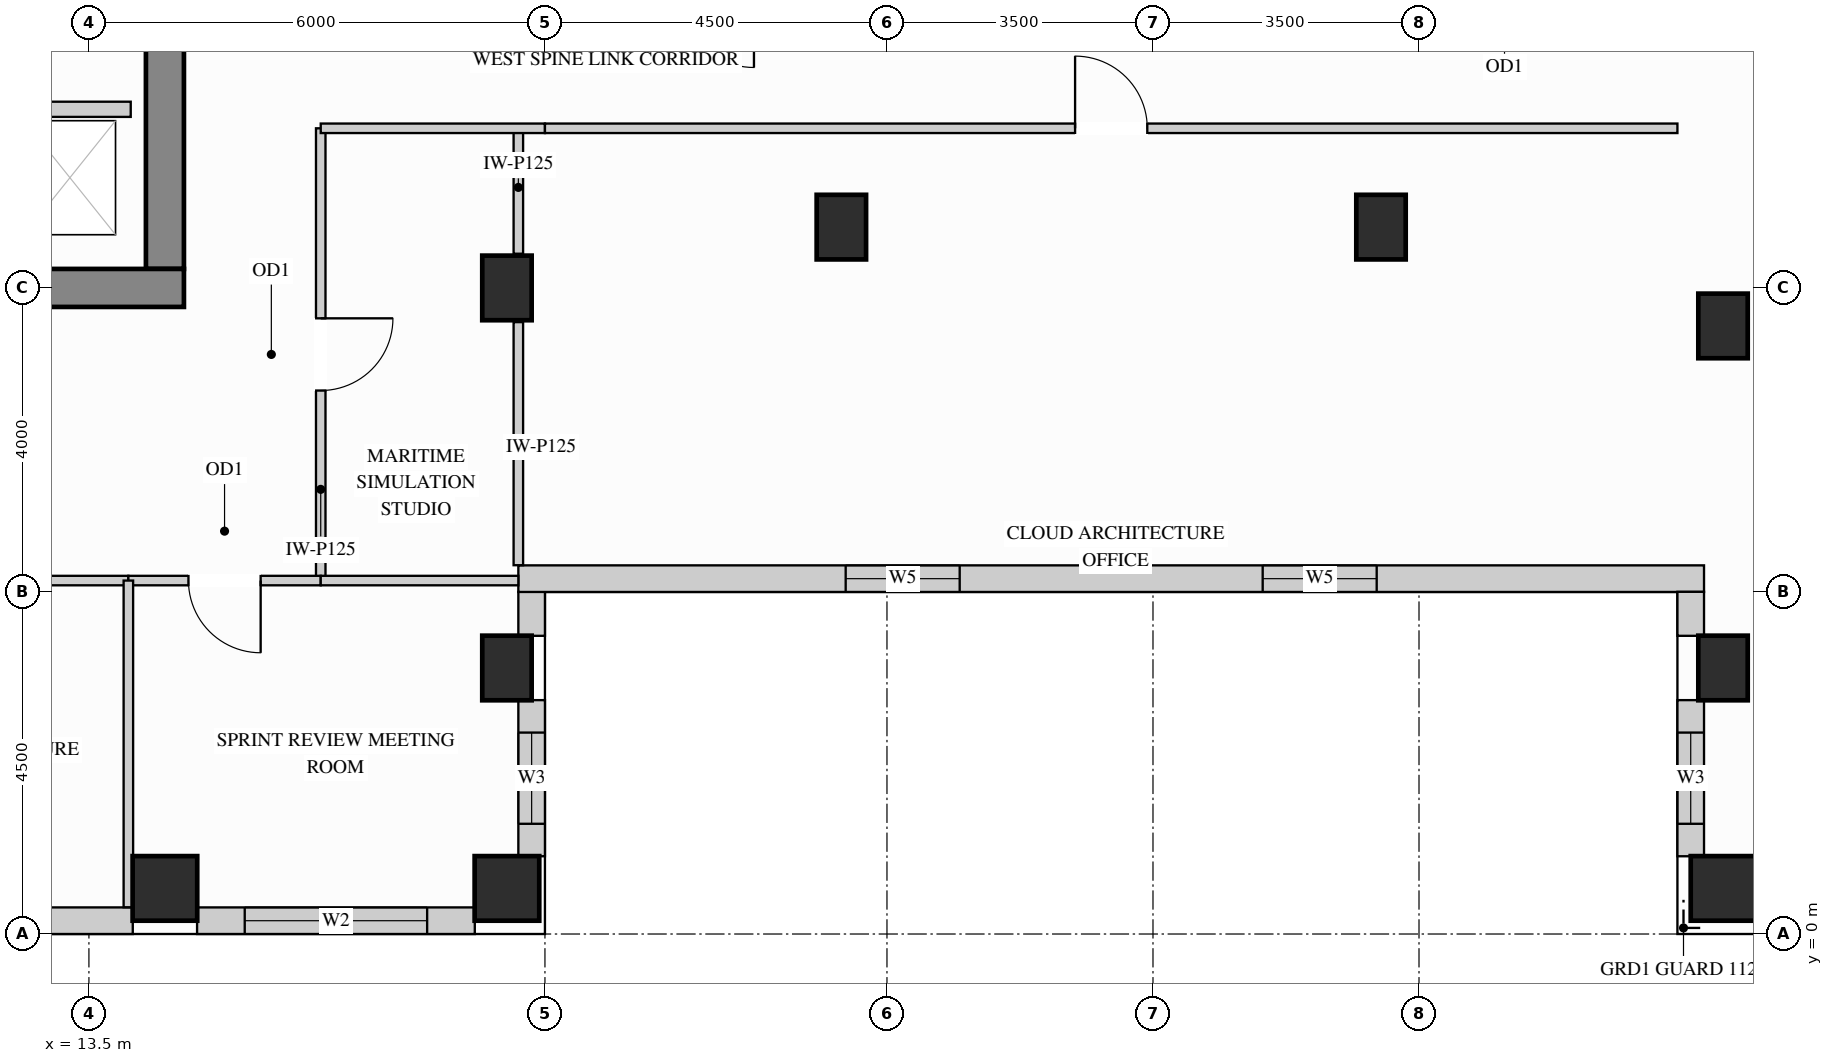
"""IFC4 building model, lengths in metres.
Left out: names, types, materials, properties, quantities, classifications, styles, units other than length and angle.
Written with IfcOpenShell. Run it as: python <this file> out.ifc"""

import sys

from ifc_helpers import new_model, si_unit, direction, frame, frame_2d, origin, origin_2d, place, context, subcontext, project, spatial, rectangle, extrude, source, transform, mapped, element, fill, save


model = new_model("IFC4")
c1 = context("Model", 3, precision=1e-05, world=origin(), true_north=direction((0.0, 1.0)))
c2 = subcontext(c1, "Body", "Model", "MODEL_VIEW")
j1 = project(units=[si_unit("LENGTHUNIT", "METRE"), si_unit("PLANEANGLEUNIT", "RADIAN")], contexts=[c1])
p1 = place(None, origin())
s1 = spatial("IfcSite", under=j1, at=p1, CompositionType="ELEMENT")
p2 = place(p1, origin())
s2 = spatial("IfcBuilding", under=s1, at=p2, CompositionType="ELEMENT")
p3 = place(p2, frame((0.0, 0.0, 212.4)))
s3 = spatial("IfcBuildingStorey", under=s2, at=p3, CompositionType="ELEMENT", Elevation=212.4)
m1 = source(origin(), c2, "Body", "SweptSolid", [
    extrude(rectangle(XDim=0.65, YDim=0.85, at=origin_2d()), origin(), (0.0, 0.0, 1.0), 3.4),
])
for number, where, z_axis, x_axis in (
    (1, (19.0, 3.5, 0.0), (0.0, 0.0, 1.0), (1.0, 0.0, 0.0)),
    (2, (19.0, 8.5, 0.0), (0.0, 0.0, 1.0), (1.0, 0.0, 0.0)),
    (3, (35.0, 3.5, 0.0), (0.0, 0.0, 1.0), (1.0, 0.0, 0.0)),
    (4, (35.0, 8.0, 0.0), (0.0, 0.0, 1.0), (1.0, 0.0, 0.0)),
    (5, (23.4, 9.3, 0.0), (0.0, 0.0, 1.0), (1.0, 0.0, 0.0)),
    (6, (30.5, 9.3, 0.0), (0.0, 0.0, 1.0), (1.0, 0.0, 0.0)),
):
    element("IfcColumn", number, at=place(p3, frame(where, z_axis=z_axis, x_axis=x_axis)), inside=s3, PredefinedType="COLUMN", context=c2, shape_type="MappedRepresentation", body=[
        mapped(m1, transform((0.0, 0.0, 0.0), x_axis=(1.0, 0.0, 0.0), y_axis=(0.0, 1.0, 0.0), z_axis=(0.0, 0.0, 1.0))),
    ])
m2 = source(origin(), c2, "Body", "SweptSolid", [
    extrude(rectangle(XDim=0.85, YDim=0.85, at=origin_2d()), origin(), (0.0, 0.0, 1.0), 3.4),
])
for number, where, z_axis, x_axis in (
    (7, (14.5, 0.6, 0.0), (0.0, 0.0, 1.0), (1.0, 0.0, 0.0)),
    (8, (19.0, 0.6, 0.0), (0.0, 0.0, 1.0), (1.0, 0.0, 0.0)),
    (9, (35.0, 0.6, 0.0), (0.0, 0.0, 1.0), (1.0, 0.0, 0.0)),
):
    element("IfcColumn", number, at=place(p3, frame(where, z_axis=z_axis, x_axis=x_axis)), inside=s3, PredefinedType="COLUMN", context=c2, shape_type="MappedRepresentation", body=[
        mapped(m2, transform((0.0, 0.0, 0.0), x_axis=(1.0, 0.0, 0.0), y_axis=(0.0, 1.0, 0.0), z_axis=(0.0, 0.0, 1.0))),
    ])
m3 = source(origin(), c2, "Body", "SweptSolid", [
    extrude(rectangle(XDim=10.07, YDim=0.5, at=frame_2d((5.035, 0.0))), origin(), (0.0, 0.0, 1.0), 3.4),
])
p4 = place(p3, frame((14.5, 8.75, 0.0), z_axis=(0.0, 0.0, 1.0), x_axis=(0.0, 1.0, 0.0)))
e10 = element("IfcWall", 10, at=p4, inside=s3, PredefinedType="SHEAR", context=c2, shape_type="MappedRepresentation", body=[
    mapped(m3, transform((0.0, 0.0, 0.0), x_axis=(1.0, 0.0, 0.0), y_axis=(0.0, 1.0, 0.0), z_axis=(0.0, 0.0, 1.0))),
])
m4 = source(origin(), c2, "Body", "SweptSolid", [
    extrude(rectangle(XDim=10.5, YDim=0.5, at=frame_2d((5.25, 0.0))), origin(), (0.0, 0.0, 1.0), 3.4),
])
p5 = place(p3, frame((4.25, 8.5, 0.0), z_axis=(0.0, 0.0, 1.0), x_axis=(1.0, 0.0, 0.0)))
e11 = element("IfcWall", 11, at=p5, inside=s3, PredefinedType="SHEAR", context=c2, shape_type="MappedRepresentation", body=[
    mapped(m4, transform((0.0, 0.0, 0.0), x_axis=(1.0, 0.0, 0.0), y_axis=(0.0, 1.0, 0.0), z_axis=(0.0, 0.0, 1.0))),
])
p6 = place(p3, frame((9.423, 0.175, 0.0), z_axis=(0.0, 0.0, 1.0), x_axis=(1.0, 0.0, 0.0)))
e12 = element("IfcWall", 12, at=p6, inside=s3, PredefinedType="SOLIDWALL", context=c2, shape_type="SweptSolid", body=[
    extrude(rectangle(XDim=4.654, YDim=0.35, at=frame_2d((2.327, 0.0))), origin(), (0.0, 0.0, 1.0), 3.385),
])
p7 = place(p6, frame((1.127, 0.0, 0.78)))
e13 = element("IfcOpeningElement", 13, at=p7, cuts=e12, PredefinedType="OPENING", context=c2, shape_type="SweptSolid", body=[
    extrude(rectangle(XDim=2.4, YDim=2.1, at=frame_2d((1.2, 1.05))), frame((0.0, 0.185, 0.0), z_axis=(0.0, -1.0, 0.0), x_axis=(1.0, 0.0, 0.0)), (0.0, 0.0, 1.0), 0.37),
])
p8 = place(p3, frame((14.923, 0.175, 0.0), z_axis=(0.0, 0.0, 1.0), x_axis=(1.0, 0.0, 0.0)))
e14 = element("IfcWall", 14, at=p8, inside=s3, PredefinedType="SOLIDWALL", context=c2, shape_type="SweptSolid", body=[
    extrude(rectangle(XDim=3.654, YDim=0.35, at=frame_2d((1.827, 0.0))), origin(), (0.0, 0.0, 1.0), 3.385),
])
p9 = place(p8, frame((0.627, 0.0, 0.78)))
e15 = element("IfcOpeningElement", 15, at=p9, cuts=e14, PredefinedType="OPENING", context=c2, shape_type="SweptSolid", body=[
    extrude(rectangle(XDim=2.4, YDim=2.1, at=frame_2d((1.2, 1.05))), frame((0.0, 0.185, 0.0), z_axis=(0.0, -1.0, 0.0), x_axis=(1.0, 0.0, 0.0)), (0.0, 0.0, 1.0), 0.37),
])
p10 = place(p3, frame((19.325, 1.023, 0.0), z_axis=(0.0, 0.0, 1.0), x_axis=(0.0, 1.0, 0.0)))
e16 = element("IfcWall", 16, at=p10, inside=s3, PredefinedType="SOLIDWALL", context=c2, shape_type="SweptSolid", body=[
    extrude(rectangle(XDim=2.054, YDim=0.35, at=frame_2d((1.027, 0.0))), origin(), (0.0, 0.0, 1.0), 2.619),
])
p11 = place(p10, frame((0.427, 0.0, 0.78)))
e17 = element("IfcOpeningElement", 17, at=p11, cuts=e16, PredefinedType="OPENING", context=c2, shape_type="SweptSolid", body=[
    extrude(rectangle(XDim=1.2, YDim=1.659, at=frame_2d((0.6, 0.83))), frame((0.0, 0.185, 0.0), z_axis=(0.0, -1.0, 0.0), x_axis=(1.0, 0.0, 0.0)), (0.0, 0.0, 1.0), 0.37),
])
m5 = source(origin(), c2, "Body", "SweptSolid", [
    extrude(rectangle(XDim=0.579, YDim=0.35, at=frame_2d((0.29, 0.0))), origin(), (0.0, 0.0, 1.0), 2.773),
])
p12 = place(p3, frame((19.325, 3.923, 0.0), z_axis=(0.0, 0.0, 1.0), x_axis=(0.0, 1.0, 0.0)))
e18 = element("IfcWall", 18, at=p12, inside=s3, PredefinedType="SOLIDWALL", context=c2, shape_type="MappedRepresentation", body=[
    mapped(m5, transform((0.0, 0.0, 0.0), x_axis=(1.0, 0.0, 0.0), y_axis=(0.0, 1.0, 0.0), z_axis=(0.0, 0.0, 1.0))),
])
p13 = place(p3, frame((19.15, 4.675, 0.0), z_axis=(0.0, 0.0, 1.0), x_axis=(1.0, 0.0, 0.0)))
e19 = element("IfcWall", 19, at=p13, inside=s3, PredefinedType="SOLIDWALL", context=c2, shape_type="SweptSolid", body=[
    extrude(rectangle(XDim=15.6, YDim=0.35, at=frame_2d((7.8, 0.0))), origin(), (0.0, 0.0, 1.0), 3.385),
])
p14 = place(p13, frame((4.307, 0.0, 0.78)))
e20 = element("IfcOpeningElement", 20, at=p14, cuts=e19, PredefinedType="OPENING", context=c2, shape_type="SweptSolid", body=[
    extrude(rectangle(XDim=1.5, YDim=2.0, at=frame_2d((0.75, 1.0))), frame((0.0, 0.185, 0.0), z_axis=(0.0, -1.0, 0.0), x_axis=(1.0, 0.0, 0.0)), (0.0, 0.0, 1.0), 0.37),
])
p15 = place(p13, frame((9.793, 0.0, 0.78)))
e21 = element("IfcOpeningElement", 21, at=p15, cuts=e19, PredefinedType="OPENING", context=c2, shape_type="SweptSolid", body=[
    extrude(rectangle(XDim=1.5, YDim=2.0, at=frame_2d((0.75, 1.0))), frame((0.0, 0.185, 0.0), z_axis=(0.0, -1.0, 0.0), x_axis=(1.0, 0.0, 0.0)), (0.0, 0.0, 1.0), 0.37),
])
m6 = source(origin(), c2, "Body", "SweptSolid", [
    extrude(rectangle(XDim=0.579, YDim=0.35, at=frame_2d((0.29, 0.0))), origin(), (0.0, 0.0, 1.0), 3.385),
])
p16 = place(p3, frame((34.575, 4.502, 0.0), z_axis=(0.0, 0.0, 1.0), x_axis=(0.0, -1.0, 0.0)))
e22 = element("IfcWall", 22, at=p16, inside=s3, PredefinedType="SOLIDWALL", context=c2, shape_type="MappedRepresentation", body=[
    mapped(m6, transform((0.0, 0.0, 0.0), x_axis=(1.0, 0.0, 0.0), y_axis=(0.0, 1.0, 0.0), z_axis=(0.0, 0.0, 1.0))),
])
p17 = place(p3, frame((34.575, 3.077, 0.0), z_axis=(0.0, 0.0, 1.0), x_axis=(0.0, -1.0, 0.0)))
e23 = element("IfcWall", 23, at=p17, inside=s3, PredefinedType="SOLIDWALL", context=c2, shape_type="SweptSolid", body=[
    extrude(rectangle(XDim=2.054, YDim=0.35, at=frame_2d((1.027, 0.0))), origin(), (0.0, 0.0, 1.0), 3.385),
])
p18 = place(p17, frame((0.427, 0.0, 0.78)))
e24 = element("IfcOpeningElement", 24, at=p18, cuts=e23, PredefinedType="OPENING", context=c2, shape_type="SweptSolid", body=[
    extrude(rectangle(XDim=1.2, YDim=2.0, at=frame_2d((0.6, 1.0))), frame((0.0, 0.185, 0.0), z_axis=(0.0, -1.0, 0.0), x_axis=(1.0, 0.0, 0.0)), (0.0, 0.0, 1.0), 0.37),
])
m7 = source(origin(), c2, "Body", "SweptSolid", [
    extrude(rectangle(XDim=3.198, YDim=0.125, at=frame_2d((1.599, 0.0))), origin(), (0.0, 0.0, 1.0), 2.773),
])
p19 = place(p3, frame((19.15, 4.852, 0.0), z_axis=(0.0, 0.0, 1.0), x_axis=(0.0, 1.0, 0.0)))
e25 = element("IfcWall", 25, at=p19, inside=s3, PredefinedType="PARTITIONING", context=c2, shape_type="MappedRepresentation", body=[
    mapped(m7, transform((0.0, 0.0, 0.0), x_axis=(1.0, 0.0, 0.0), y_axis=(0.0, 1.0, 0.0), z_axis=(0.0, 0.0, 1.0))),
])
m8 = source(origin(), c2, "Body", "SweptSolid", [
    extrude(rectangle(XDim=1.65, YDim=0.125, at=frame_2d((0.825, 0.0))), origin(), (0.0, 0.0, 1.0), 2.773),
])
p20 = place(p3, frame((19.15, 8.95, 0.0), z_axis=(0.0, 0.0, 1.0), x_axis=(0.0, 1.0, 0.0)))
e26 = element("IfcWall", 26, at=p20, inside=s3, PredefinedType="PARTITIONING", context=c2, shape_type="MappedRepresentation", body=[
    mapped(m8, transform((0.0, 0.0, 0.0), x_axis=(1.0, 0.0, 0.0), y_axis=(0.0, 1.0, 0.0), z_axis=(0.0, 0.0, 1.0))),
])
p21 = place(p3, frame((16.55, 4.65, 0.0), z_axis=(0.0, 0.0, 1.0), x_axis=(0.0, 1.0, 0.0)))
e27 = element("IfcWall", 27, at=p21, inside=s3, PredefinedType="PARTITIONING", context=c2, shape_type="SweptSolid", body=[
    extrude(rectangle(XDim=5.95, YDim=0.125, at=frame_2d((2.975, 0.0))), origin(), (0.0, 0.0, 1.0), 3.385),
])
p22 = place(p21, frame((2.5, 0.0, 0.0)))
e28 = element("IfcOpeningElement", 28, at=p22, cuts=e27, PredefinedType="OPENING", context=c2, shape_type="SweptSolid", body=[
    extrude(rectangle(XDim=0.95, YDim=2.15, at=frame_2d((0.475, 1.075))), frame((0.0, 0.073, 0.0), z_axis=(0.0, -1.0, 0.0), x_axis=(1.0, 0.0, 0.0)), (0.0, 0.0, 1.0), 0.145),
])
m9 = source(origin(), c2, "Body", "SweptSolid", [
    extrude(rectangle(XDim=2.95, YDim=0.125, at=frame_2d((1.475, 0.0))), origin(), (0.0, 0.0, 1.0), 3.385),
])
p23 = place(p3, frame((16.55, 10.6, 0.0), z_axis=(0.0, 0.0, 1.0), x_axis=(1.0, 0.0, 0.0)))
e29 = element("IfcWall", 29, at=p23, inside=s3, PredefinedType="PARTITIONING", context=c2, shape_type="MappedRepresentation", body=[
    mapped(m9, transform((0.0, 0.0, 0.0), x_axis=(1.0, 0.0, 0.0), y_axis=(0.0, 1.0, 0.0), z_axis=(0.0, 0.0, 1.0))),
])
p24 = place(p3, frame((19.5, 10.6, 0.0), z_axis=(0.0, 0.0, 1.0), x_axis=(1.0, 0.0, 0.0)))
e30 = element("IfcWall", 30, at=p24, inside=s3, PredefinedType="PARTITIONING", context=c2, shape_type="SweptSolid", body=[
    extrude(rectangle(XDim=14.9, YDim=0.125, at=frame_2d((7.45, 0.0))), origin(), (0.0, 0.0, 1.0), 3.385),
])
p25 = place(p24, frame((6.975, 0.0, 0.0)))
e31 = element("IfcOpeningElement", 31, at=p25, cuts=e30, PredefinedType="OPENING", context=c2, shape_type="SweptSolid", body=[
    extrude(rectangle(XDim=0.95, YDim=2.15, at=frame_2d((0.475, 1.075))), frame((0.0, 0.073, 0.0), z_axis=(0.0, -1.0, 0.0), x_axis=(1.0, 0.0, 0.0)), (0.0, 0.0, 1.0), 0.145),
])
p26 = place(p3, frame((8.227, 4.65, 0.0), z_axis=(0.0, 0.0, 1.0), x_axis=(1.0, 0.0, 0.0)))
e32 = element("IfcWall", 32, at=p26, inside=s3, PredefinedType="PARTITIONING", context=c2, shape_type="SweptSolid", body=[
    extrude(rectangle(XDim=5.792, YDim=0.125, at=frame_2d((2.896, 0.0))), origin(), (0.0, 0.0, 1.0), 2.848),
])
p27 = place(p26, frame((2.421, 0.0, 0.0)))
e33 = element("IfcOpeningElement", 33, at=p27, cuts=e32, PredefinedType="OPENING", context=c2, shape_type="SweptSolid", body=[
    extrude(rectangle(XDim=0.95, YDim=2.15, at=frame_2d((0.475, 1.075))), frame((0.0, 0.073, 0.0), z_axis=(0.0, -1.0, 0.0), x_axis=(1.0, 0.0, 0.0)), (0.0, 0.0, 1.0), 0.145),
])
p28 = place(p3, frame((14.019, 4.65, 0.0), z_axis=(0.0, 0.0, 1.0), x_axis=(1.0, 0.0, 0.0)))
e34 = element("IfcWall", 34, at=p28, inside=s3, PredefinedType="PARTITIONING", context=c2, shape_type="SweptSolid", body=[
    extrude(rectangle(XDim=2.531, YDim=0.125, at=frame_2d((1.266, 0.0))), origin(), (0.0, 0.0, 1.0), 2.848),
])
p29 = place(p28, frame((0.791, 0.0, 0.0)))
e35 = element("IfcOpeningElement", 35, at=p29, cuts=e34, PredefinedType="OPENING", context=c2, shape_type="SweptSolid", body=[
    extrude(rectangle(XDim=0.95, YDim=2.15, at=frame_2d((0.475, 1.075))), frame((0.0, 0.073, 0.0), z_axis=(0.0, -1.0, 0.0), x_axis=(1.0, 0.0, 0.0)), (0.0, 0.0, 1.0), 0.145),
])
m10 = source(origin(), c2, "Body", "SweptSolid", [
    extrude(rectangle(XDim=2.6, YDim=0.125, at=frame_2d((1.3, 0.0))), origin(), (0.0, 0.0, 1.0), 2.848),
])
p30 = place(p3, frame((16.55, 4.65, 0.0), z_axis=(0.0, 0.0, 1.0), x_axis=(1.0, 0.0, 0.0)))
e36 = element("IfcWall", 36, at=p30, inside=s3, PredefinedType="PARTITIONING", context=c2, shape_type="MappedRepresentation", body=[
    mapped(m10, transform((0.0, 0.0, 0.0), x_axis=(1.0, 0.0, 0.0), y_axis=(0.0, 1.0, 0.0), z_axis=(0.0, 0.0, 1.0))),
])
m11 = source(origin(), c2, "Body", "SweptSolid", [
    extrude(rectangle(XDim=4.298, YDim=0.125, at=frame_2d((2.149, 0.0))), origin(), (0.0, 0.0, 1.0), 3.385),
])
p31 = place(p3, frame((14.019, 0.352, 0.0), z_axis=(0.0, 0.0, 1.0), x_axis=(0.0, 1.0, 0.0)))
e37 = element("IfcWall", 37, at=p31, inside=s3, PredefinedType="PARTITIONING", context=c2, shape_type="MappedRepresentation", body=[
    mapped(m11, transform((0.0, 0.0, 0.0), x_axis=(1.0, 0.0, 0.0), y_axis=(0.0, 1.0, 0.0), z_axis=(0.0, 0.0, 1.0))),
])
m12 = source(origin(), c2, "Body", "SweptSolid", [
    extrude(rectangle(XDim=1.63, YDim=0.2, at=frame_2d((0.815, 0.0))), origin(), (0.0, 0.0, 1.0), 3.385),
])
p32 = place(p3, frame((12.42, 10.85, 0.0), z_axis=(0.0, 0.0, 1.0), x_axis=(1.0, 0.0, 0.0)))
e38 = element("IfcWall", 38, at=p32, inside=s3, PredefinedType="PARTITIONING", context=c2, shape_type="MappedRepresentation", body=[
    mapped(m12, transform((0.0, 0.0, 0.0), x_axis=(1.0, 0.0, 0.0), y_axis=(0.0, 1.0, 0.0), z_axis=(0.0, 0.0, 1.0))),
])
m13 = source(origin(), c2, "Body", "SweptSolid", [
    extrude(rectangle(XDim=0.95, YDim=2.15, at=frame_2d((0.475, 1.075))), frame((0.0, 0.025, 0.0), z_axis=(0.0, -1.0, 0.0), x_axis=(1.0, 0.0, 0.0)), (0.0, 0.0, 1.0), 0.05),
])
p33 = place(p22, origin())
e39 = element("IfcDoor", 39, at=p33, inside=s3, OperationType="SINGLE_SWING_RIGHT", PredefinedType="DOOR", context=c2, shape_type="MappedRepresentation", body=[
    mapped(m13, transform((0.0, 0.0, 0.0), x_axis=(1.0, 0.0, 0.0), y_axis=(0.0, 1.0, 0.0), z_axis=(0.0, 0.0, 1.0))),
])
fill(e28, e39)
p34 = place(p29, origin())
e40 = element("IfcDoor", 40, at=p34, inside=s3, OperationType="SINGLE_SWING_RIGHT", PredefinedType="DOOR", context=c2, shape_type="MappedRepresentation", body=[
    mapped(m13, transform((0.0, 0.0, 0.0), x_axis=(1.0, 0.0, 0.0), y_axis=(0.0, 1.0, 0.0), z_axis=(0.0, 0.0, 1.0))),
])
fill(e35, e40)
p35 = place(p25, origin())
e41 = element("IfcDoor", 41, at=p35, inside=s3, OperationType="SINGLE_SWING_LEFT", PredefinedType="DOOR", context=c2, shape_type="MappedRepresentation", body=[
    mapped(m13, transform((0.0, 0.0, 0.0), x_axis=(1.0, 0.0, 0.0), y_axis=(0.0, 1.0, 0.0), z_axis=(0.0, 0.0, 1.0))),
])
fill(e31, e41)
m14 = source(origin(), c2, "Body", "SweptSolid", [
    extrude(rectangle(XDim=2.4, YDim=2.1, at=frame_2d((1.2, 1.05))), frame((0.0, 0.03, 0.0), z_axis=(0.0, -1.0, 0.0), x_axis=(1.0, 0.0, 0.0)), (0.0, 0.0, 1.0), 0.06),
])
p36 = place(p9, origin())
e42 = element("IfcWindow", 42, at=p36, inside=s3, PartitioningType="SINGLE_PANEL", PredefinedType="WINDOW", context=c2, shape_type="MappedRepresentation", body=[
    mapped(m14, transform((0.0, 0.0, 0.0), x_axis=(1.0, 0.0, 0.0), y_axis=(0.0, 1.0, 0.0), z_axis=(0.0, 0.0, 1.0))),
])
fill(e15, e42)
m15 = source(origin(), c2, "Body", "SweptSolid", [
    extrude(rectangle(XDim=1.2, YDim=1.659, at=frame_2d((0.6, 0.83))), frame((0.0, 0.03, 0.0), z_axis=(0.0, -1.0, 0.0), x_axis=(1.0, 0.0, 0.0)), (0.0, 0.0, 1.0), 0.06),
])
p37 = place(p11, origin())
e43 = element("IfcWindow", 43, at=p37, inside=s3, PartitioningType="SINGLE_PANEL", PredefinedType="WINDOW", context=c2, shape_type="MappedRepresentation", body=[
    mapped(m15, transform((0.0, 0.0, 0.0), x_axis=(1.0, 0.0, 0.0), y_axis=(0.0, 1.0, 0.0), z_axis=(0.0, 0.0, 1.0))),
])
fill(e17, e43)
m16 = source(origin(), c2, "Body", "SweptSolid", [
    extrude(rectangle(XDim=1.2, YDim=2.0, at=frame_2d((0.6, 1.0))), frame((0.0, 0.03, 0.0), z_axis=(0.0, -1.0, 0.0), x_axis=(1.0, 0.0, 0.0)), (0.0, 0.0, 1.0), 0.06),
])
p38 = place(p18, origin())
e44 = element("IfcWindow", 44, at=p38, inside=s3, PartitioningType="SINGLE_PANEL", PredefinedType="WINDOW", context=c2, shape_type="MappedRepresentation", body=[
    mapped(m16, transform((0.0, 0.0, 0.0), x_axis=(1.0, 0.0, 0.0), y_axis=(0.0, 1.0, 0.0), z_axis=(0.0, 0.0, 1.0))),
])
fill(e24, e44)
m17 = source(origin(), c2, "Body", "SweptSolid", [
    extrude(rectangle(XDim=1.5, YDim=2.0, at=frame_2d((0.75, 1.0))), frame((0.0, 0.03, 0.0), z_axis=(0.0, -1.0, 0.0), x_axis=(1.0, 0.0, 0.0)), (0.0, 0.0, 1.0), 0.06),
])
p39 = place(p14, origin())
e45 = element("IfcWindow", 45, at=p39, inside=s3, PartitioningType="SINGLE_PANEL", PredefinedType="WINDOW", context=c2, shape_type="MappedRepresentation", body=[
    mapped(m17, transform((0.0, 0.0, 0.0), x_axis=(1.0, 0.0, 0.0), y_axis=(0.0, 1.0, 0.0), z_axis=(0.0, 0.0, 1.0))),
])
fill(e20, e45)
p40 = place(p15, origin())
e46 = element("IfcWindow", 46, at=p40, inside=s3, PartitioningType="SINGLE_PANEL", PredefinedType="WINDOW", context=c2, shape_type="MappedRepresentation", body=[
    mapped(m17, transform((0.0, 0.0, 0.0), x_axis=(1.0, 0.0, 0.0), y_axis=(0.0, 1.0, 0.0), z_axis=(0.0, 0.0, 1.0))),
])
fill(e21, e46)
save(model, sys.argv[1])
